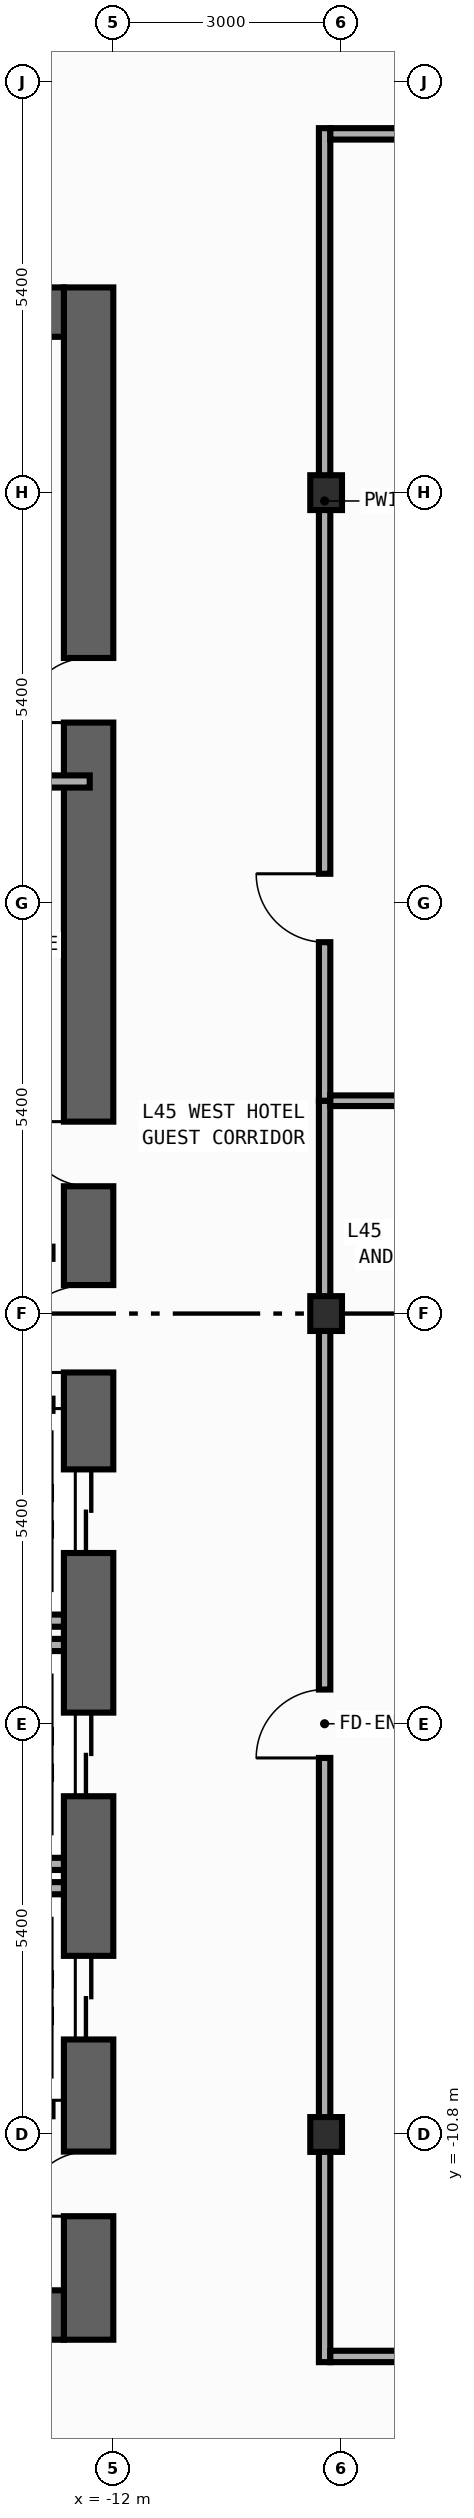
"""IFC4 building model, lengths in metres.
Left out: names, types, materials, properties, quantities, classifications, styles, units other than length and angle.
Written with IfcOpenShell. Run it as: python <this file> out.ifc"""

import sys

from ifc_helpers import new_model, si_unit, direction, frame, frame_2d, origin, origin_2d, place, context, subcontext, project, spatial, rectangle, i_section, extrude, element, fill, save


model = new_model("IFC4")
c1 = context("Model", 3, precision=1e-05, world=origin(), true_north=direction((0.0, 1.0)))
c2 = subcontext(c1, "Body", "Model", "MODEL_VIEW")
j1 = project(units=[si_unit("LENGTHUNIT", "METRE"), si_unit("PLANEANGLEUNIT", "RADIAN")], contexts=[c1])
p1 = place(None, origin())
s1 = spatial("IfcSite", under=j1, at=p1, CompositionType="ELEMENT")
p2 = place(p1, origin())
s2 = spatial("IfcBuilding", under=s1, at=p2, CompositionType="ELEMENT")
p3 = place(p2, frame((0.0, 0.0, 195.4)))
s3 = spatial("IfcBuildingStorey", under=s2, at=p3, CompositionType="ELEMENT", Elevation=195.4)
p4 = place(p3, frame((-12.325, -13.5, 0.0), z_axis=(0.0, 0.0, 1.0), x_axis=(0.0, 1.0, 0.0)))
e1 = element("IfcWall", 1, at=p4, inside=s3, PredefinedType="SHEAR", context=c2, shape_type="SweptSolid", body=[
    extrude(rectangle(XDim=27.0, YDim=0.65, at=frame_2d((13.5, 0.0))), origin(), (0.0, 0.0, 1.0), 3.54),
])
p5 = place(p4, frame((10.35, 0.0, 0.0)))
e2 = element("IfcOpeningElement", 2, at=p5, cuts=e1, PredefinedType="OPENING", context=c2, shape_type="SweptSolid", body=[
    extrude(rectangle(XDim=1.1, YDim=2.2, at=frame_2d((0.55, 1.1))), frame((0.0, 0.335, 0.0), z_axis=(0.0, -1.0, 0.0), x_axis=(1.0, 0.0, 0.0)), (0.0, 0.0, 1.0), 0.67),
])
p6 = place(p4, frame((7.15, 0.0, 0.0)))
e3 = element("IfcOpeningElement", 3, at=p6, cuts=e1, PredefinedType="OPENING", context=c2, shape_type="SweptSolid", body=[
    extrude(rectangle(XDim=1.1, YDim=2.2, at=frame_2d((0.55, 1.1))), frame((0.0, 0.335, 0.0), z_axis=(0.0, -1.0, 0.0), x_axis=(1.0, 0.0, 0.0)), (0.0, 0.0, 1.0), 0.67),
])
p7 = place(p4, frame((3.95, 0.0, 0.0)))
e4 = element("IfcOpeningElement", 4, at=p7, cuts=e1, PredefinedType="OPENING", context=c2, shape_type="SweptSolid", body=[
    extrude(rectangle(XDim=1.1, YDim=2.2, at=frame_2d((0.55, 1.1))), frame((0.0, 0.335, 0.0), z_axis=(0.0, -1.0, 0.0), x_axis=(1.0, 0.0, 0.0)), (0.0, 0.0, 1.0), 0.67),
])
p8 = place(p4, frame((15.175, 0.0, 0.0)))
e5 = element("IfcOpeningElement", 5, at=p8, cuts=e1, PredefinedType="OPENING", context=c2, shape_type="SweptSolid", body=[
    extrude(rectangle(XDim=0.85, YDim=2.1, at=frame_2d((0.425, 1.05))), frame((0.0, 0.335, 0.0), z_axis=(0.0, -1.0, 0.0), x_axis=(1.0, 0.0, 0.0)), (0.0, 0.0, 1.0), 0.67),
])
p9 = place(p4, frame((21.275, 0.0, 0.0)))
e6 = element("IfcOpeningElement", 6, at=p9, cuts=e1, PredefinedType="OPENING", context=c2, shape_type="SweptSolid", body=[
    extrude(rectangle(XDim=0.85, YDim=2.1, at=frame_2d((0.425, 1.05))), frame((0.0, 0.335, 0.0), z_axis=(0.0, -1.0, 0.0), x_axis=(1.0, 0.0, 0.0)), (0.0, 0.0, 1.0), 0.67),
])
p10 = place(p4, frame((12.725, 0.0, 0.0)))
e7 = element("IfcOpeningElement", 7, at=p10, cuts=e1, PredefinedType="OPENING", context=c2, shape_type="SweptSolid", body=[
    extrude(rectangle(XDim=1.15, YDim=2.2, at=frame_2d((0.575, 1.1))), frame((0.0, 0.335, 0.0), z_axis=(0.0, -1.0, 0.0), x_axis=(1.0, 0.0, 0.0)), (0.0, 0.0, 1.0), 0.67),
])
p11 = place(p4, frame((1.625, 0.0, 0.0)))
e8 = element("IfcOpeningElement", 8, at=p11, cuts=e1, PredefinedType="OPENING", context=c2, shape_type="SweptSolid", body=[
    extrude(rectangle(XDim=0.85, YDim=2.1, at=frame_2d((0.425, 1.05))), frame((0.0, 0.335, 0.0), z_axis=(0.0, -1.0, 0.0), x_axis=(1.0, 0.0, 0.0)), (0.0, 0.0, 1.0), 0.67),
])
for number, where, z_axis, x_axis in (
    (9, (-19.75, -13.175, 0.0), (0.0, 0.0, 1.0), (1.0, 0.0, 0.0)),
    (10, (-19.75, 13.175, 0.0), (0.0, 0.0, 1.0), (1.0, 0.0, 0.0)),
):
    element("IfcWall", number, at=place(p3, frame(where, z_axis=z_axis, x_axis=x_axis)), inside=s3, PredefinedType="SHEAR", context=c2, shape_type="SweptSolid", body=[
        extrude(rectangle(XDim=7.1, YDim=0.65, at=frame_2d((3.55, 0.0))), origin(), (0.0, 0.0, 1.0), 3.54),
    ])
for number, where, z_axis, x_axis in (
    (11, (-9.2, -10.8, 0.0), (0.0, 0.0, 1.0), (1.0, 0.0, 0.0)),
    (12, (-9.2, 0.0, 0.0), (0.0, 0.0, 1.0), (1.0, 0.0, 0.0)),
    (13, (-9.2, 10.8, 0.0), (0.0, 0.0, 1.0), (1.0, 0.0, 0.0)),
):
    element("IfcColumn", number, at=place(p3, frame(where, z_axis=z_axis, x_axis=x_axis)), inside=s3, PredefinedType="COLUMN", context=c2, shape_type="SweptSolid", body=[
        extrude(i_section(OverallWidth=0.417, OverallDepth=0.458, WebThickness=0.03, FlangeThickness=0.05, FilletRadius=0.022, at=origin_2d()), origin(), (0.0, 0.0, 1.0), 3.8),
    ])
for number, where, z_axis, x_axis in (
    (14, (-14.99, -4.04, 0.0), (0.0, 0.0, 1.0), (1.0, 0.0, 0.0)),
    (15, (-14.99, -7.24, 0.0), (0.0, 0.0, 1.0), (1.0, 0.0, 0.0)),
    (16, (-14.99, -4.36, 0.0), (0.0, 0.0, 1.0), (1.0, 0.0, 0.0)),
    (17, (-14.99, -7.56, 0.0), (0.0, 0.0, 1.0), (1.0, 0.0, 0.0)),
):
    element("IfcWall", number, at=place(p3, frame(where, z_axis=z_axis, x_axis=x_axis)), inside=s3, PredefinedType="STANDARD", context=c2, shape_type="SweptSolid", body=[
        extrude(rectangle(XDim=2.34, YDim=0.16, at=frame_2d((1.17, 0.0))), origin(), (0.0, 0.0, 1.0), 3.54),
    ])
p12 = place(p3, frame((-15.375, 7.0, 0.0), z_axis=(0.0, 0.0, 1.0), x_axis=(1.0, 0.0, 0.0)))
e18 = element("IfcWall", 18, at=p12, inside=s3, PredefinedType="PARTITIONING", context=c2, shape_type="SweptSolid", body=[
    extrude(rectangle(XDim=3.065, YDim=0.16, at=frame_2d((1.532, 0.0))), origin(), (0.0, 0.0, 1.0), 3.54),
])
p13 = place(p3, frame((-9.22, -13.795, 0.0), z_axis=(0.0, 0.0, 1.0), x_axis=(0.0, 1.0, 0.0)))
e19 = element("IfcWall", 19, at=p13, inside=s3, PredefinedType="PARTITIONING", context=c2, shape_type="SweptSolid", body=[
    extrude(rectangle(XDim=16.595, YDim=0.15, at=frame_2d((8.297, 0.0))), origin(), (0.0, 0.0, 1.0), 2.952),
])
p14 = place(p13, frame((7.949, 0.0, 0.0)))
e20 = element("IfcOpeningElement", 20, at=p14, cuts=e19, PredefinedType="OPENING", context=c2, shape_type="SweptSolid", body=[
    extrude(rectangle(XDim=0.9, YDim=2.15, at=frame_2d((0.45, 1.075))), frame((0.0, 0.085, 0.0), z_axis=(0.0, -1.0, 0.0), x_axis=(1.0, 0.0, 0.0)), (0.0, 0.0, 1.0), 0.17),
])
p15 = place(p3, frame((-9.22, 2.8, 0.0), z_axis=(0.0, 0.0, 1.0), x_axis=(0.0, 1.0, 0.0)))
e21 = element("IfcWall", 21, at=p15, inside=s3, PredefinedType="PARTITIONING", context=c2, shape_type="SweptSolid", body=[
    extrude(rectangle(XDim=12.795, YDim=0.15, at=frame_2d((6.397, 0.0))), origin(), (0.0, 0.0, 1.0), 2.952),
])
p16 = place(p15, frame((2.086, 0.0, 0.0)))
e22 = element("IfcOpeningElement", 22, at=p16, cuts=e21, PredefinedType="OPENING", context=c2, shape_type="SweptSolid", body=[
    extrude(rectangle(XDim=0.9, YDim=2.15, at=frame_2d((0.45, 1.075))), frame((0.0, 0.085, 0.0), z_axis=(0.0, -1.0, 0.0), x_axis=(1.0, 0.0, 0.0)), (0.0, 0.0, 1.0), 0.17),
])
p17 = place(p3, frame((-9.145, 15.52, 0.0), z_axis=(0.0, 0.0, 1.0), x_axis=(1.0, 0.0, 0.0)))
e23 = element("IfcWall", 23, at=p17, inside=s3, PredefinedType="PARTITIONING", context=c2, shape_type="SweptSolid", body=[
    extrude(rectangle(XDim=8.825, YDim=0.15, at=frame_2d((4.413, 0.0))), origin(), (0.0, 0.0, 1.0), 3.54),
])
p18 = place(p17, frame((1.661, 0.0, 0.0)))
e24 = element("IfcOpeningElement", 24, at=p18, cuts=e23, PredefinedType="OPENING", context=c2, shape_type="SweptSolid", body=[
    extrude(rectangle(XDim=0.9, YDim=2.15, at=frame_2d((0.45, 1.075))), frame((0.0, 0.085, 0.0), z_axis=(0.0, -1.0, 0.0), x_axis=(1.0, 0.0, 0.0)), (0.0, 0.0, 1.0), 0.17),
])
p19 = place(p3, frame((-9.145, -13.72, 0.0), z_axis=(0.0, 0.0, 1.0), x_axis=(1.0, 0.0, 0.0)))
e25 = element("IfcWall", 25, at=p19, inside=s3, PredefinedType="PARTITIONING", context=c2, shape_type="SweptSolid", body=[
    extrude(rectangle(XDim=3.025, YDim=0.15, at=frame_2d((1.512, 0.0))), origin(), (0.0, 0.0, 1.0), 3.54),
])
p20 = place(p19, frame((1.665, 0.0, 0.0)))
e26 = element("IfcOpeningElement", 26, at=p20, cuts=e25, PredefinedType="OPENING", context=c2, shape_type="SweptSolid", body=[
    extrude(rectangle(XDim=0.9, YDim=2.15, at=frame_2d((0.45, 1.075))), frame((0.0, 0.085, 0.0), z_axis=(0.0, -1.0, 0.0), x_axis=(1.0, 0.0, 0.0)), (0.0, 0.0, 1.0), 0.17),
])
p21 = place(p3, frame((-9.145, 2.8, 0.0), z_axis=(0.0, 0.0, 1.0), x_axis=(1.0, 0.0, 0.0)))
e27 = element("IfcWall", 27, at=p21, inside=s3, PredefinedType="PARTITIONING", context=c2, shape_type="SweptSolid", body=[
    extrude(rectangle(XDim=3.025, YDim=0.14, at=frame_2d((1.512, 0.0))), origin(), (0.0, 0.0, 1.0), 3.54),
])
p22 = place(p5, origin())
e28 = element("IfcDoor", 28, at=p22, inside=s3, OperationType="DOUBLE_DOOR_SLIDING", PredefinedType="DOOR", context=c2, shape_type="SweptSolid", body=[
    extrude(rectangle(XDim=1.1, YDim=2.2, at=frame_2d((0.55, 1.1))), frame((0.0, 0.025, 0.0), z_axis=(0.0, -1.0, 0.0), x_axis=(1.0, 0.0, 0.0)), (0.0, 0.0, 1.0), 0.05),
])
fill(e2, e28)
p23 = place(p6, origin())
e29 = element("IfcDoor", 29, at=p23, inside=s3, OperationType="DOUBLE_DOOR_SLIDING", PredefinedType="DOOR", context=c2, shape_type="SweptSolid", body=[
    extrude(rectangle(XDim=1.1, YDim=2.2, at=frame_2d((0.55, 1.1))), frame((0.0, 0.025, 0.0), z_axis=(0.0, -1.0, 0.0), x_axis=(1.0, 0.0, 0.0)), (0.0, 0.0, 1.0), 0.05),
])
fill(e3, e29)
p24 = place(p7, origin())
e30 = element("IfcDoor", 30, at=p24, inside=s3, OperationType="DOUBLE_DOOR_SLIDING", PredefinedType="DOOR", context=c2, shape_type="SweptSolid", body=[
    extrude(rectangle(XDim=1.1, YDim=2.2, at=frame_2d((0.55, 1.1))), frame((0.0, 0.025, 0.0), z_axis=(0.0, -1.0, 0.0), x_axis=(1.0, 0.0, 0.0)), (0.0, 0.0, 1.0), 0.05),
])
fill(e4, e30)
p25 = place(p8, origin())
e31 = element("IfcDoor", 31, at=p25, inside=s3, OperationType="SINGLE_SWING_RIGHT", PredefinedType="DOOR", context=c2, shape_type="SweptSolid", body=[
    extrude(rectangle(XDim=0.85, YDim=2.1, at=frame_2d((0.425, 1.05))), frame((0.0, 0.025, 0.0), z_axis=(0.0, -1.0, 0.0), x_axis=(1.0, 0.0, 0.0)), (0.0, 0.0, 1.0), 0.05),
])
fill(e5, e31)
p26 = place(p9, origin())
e32 = element("IfcDoor", 32, at=p26, inside=s3, OperationType="SINGLE_SWING_LEFT", PredefinedType="DOOR", context=c2, shape_type="SweptSolid", body=[
    extrude(rectangle(XDim=0.85, YDim=2.1, at=frame_2d((0.425, 1.05))), frame((0.0, 0.025, 0.0), z_axis=(0.0, -1.0, 0.0), x_axis=(1.0, 0.0, 0.0)), (0.0, 0.0, 1.0), 0.05),
])
fill(e6, e32)
p27 = place(p10, origin())
e33 = element("IfcDoor", 33, at=p27, inside=s3, OperationType="SINGLE_SWING_LEFT", PredefinedType="DOOR", context=c2, shape_type="SweptSolid", body=[
    extrude(rectangle(XDim=1.15, YDim=2.2, at=frame_2d((0.575, 1.1))), frame((0.0, 0.025, 0.0), z_axis=(0.0, -1.0, 0.0), x_axis=(1.0, 0.0, 0.0)), (0.0, 0.0, 1.0), 0.05),
])
fill(e7, e33)
p28 = place(p11, origin())
e34 = element("IfcDoor", 34, at=p28, inside=s3, OperationType="SINGLE_SWING_LEFT", PredefinedType="DOOR", context=c2, shape_type="SweptSolid", body=[
    extrude(rectangle(XDim=0.85, YDim=2.1, at=frame_2d((0.425, 1.05))), frame((0.0, 0.025, 0.0), z_axis=(0.0, -1.0, 0.0), x_axis=(1.0, 0.0, 0.0)), (0.0, 0.0, 1.0), 0.05),
])
fill(e8, e34)
p29 = place(p14, origin())
e35 = element("IfcDoor", 35, at=p29, inside=s3, OperationType="SINGLE_SWING_LEFT", PredefinedType="DOOR", context=c2, shape_type="SweptSolid", body=[
    extrude(rectangle(XDim=0.9, YDim=2.15, at=frame_2d((0.45, 1.075))), frame((0.0, 0.025, 0.0), z_axis=(0.0, -1.0, 0.0), x_axis=(1.0, 0.0, 0.0)), (0.0, 0.0, 1.0), 0.05),
])
fill(e20, e35)
p30 = place(p16, origin())
e36 = element("IfcDoor", 36, at=p30, inside=s3, OperationType="SINGLE_SWING_RIGHT", PredefinedType="DOOR", context=c2, shape_type="SweptSolid", body=[
    extrude(rectangle(XDim=0.9, YDim=2.15, at=frame_2d((0.45, 1.075))), frame((0.0, 0.025, 0.0), z_axis=(0.0, -1.0, 0.0), x_axis=(1.0, 0.0, 0.0)), (0.0, 0.0, 1.0), 0.05),
])
fill(e22, e36)
save(model, sys.argv[1])
